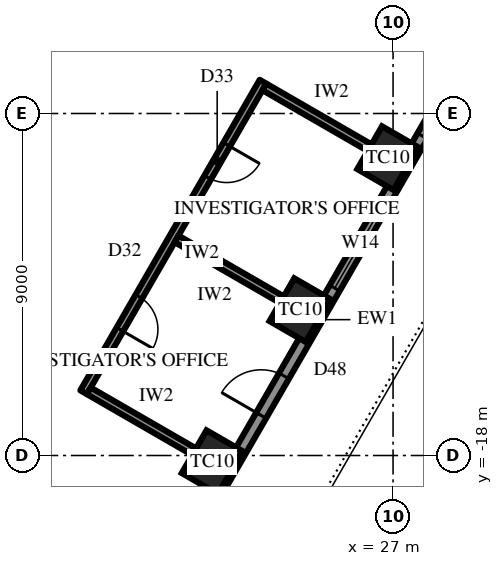
"""IFC4 building model, lengths in metres.
Left out: names, types, materials, properties, quantities, classifications, styles, units other than length and angle.
Written with IfcOpenShell. Run it as: python <this file> out.ifc"""

import sys

from ifc_helpers import new_model, si_unit, direction, frame, frame_2d, origin, origin_2d, place, context, subcontext, project, spatial, rectangle, extrude, element, fill, save


model = new_model("IFC4")
c1 = context("Model", 3, precision=1e-05, world=origin(), true_north=direction((0.0, 1.0)))
c2 = subcontext(c1, "Body", "Model", "MODEL_VIEW")
j1 = project(units=[si_unit("LENGTHUNIT", "METRE"), si_unit("PLANEANGLEUNIT", "RADIAN")], contexts=[c1])
p1 = place(None, origin())
s1 = spatial("IfcSite", under=j1, at=p1, CompositionType="ELEMENT")
p2 = place(p1, origin())
s2 = spatial("IfcBuilding", under=s1, at=p2, CompositionType="ELEMENT")
p3 = place(p2, frame((0.0, 0.0, 236.5)))
s3 = spatial("IfcBuildingStorey", under=s2, at=p3, CompositionType="ELEMENT", Elevation=236.5)
for number, where, z_axis, x_axis in (
    (1, (22.242, -18.175, 0.0), (0.0, 0.0, 1.0), (0.5, 0.866, 0.0)),
    (2, (24.552, -14.175, 0.0), (0.0, 0.0, 1.0), (0.5, 0.866, 0.0)),
    (3, (26.861, -10.175, 0.0), (0.0, 0.0, 1.0), (0.5, 0.866, 0.0)),
):
    element("IfcColumn", number, at=place(p3, frame(where, z_axis=z_axis, x_axis=x_axis)), inside=s3, PredefinedType="COLUMN", context=c2, shape_type="SweptSolid", body=[
        extrude(rectangle(XDim=1.3, YDim=1.1, at=origin_2d()), origin(), (0.0, 0.0, 1.0), 4.2),
    ])
p4 = place(p3, frame((18.707, -25.299, 0.0), z_axis=(0.0, 0.0, 1.0), x_axis=(0.500000442367, 0.866025148383, 0.0)))
e4 = element("IfcWall", 4, at=p4, inside=s3, PredefinedType="SOLIDWALL", context=c2, shape_type="SweptSolid", body=[
    extrude(rectangle(XDim=25.113, YDim=0.3, at=frame_2d((12.556, 0.0))), origin(), (0.0, 0.0, 1.0), 2.8),
])
p5 = place(p4, frame((4.278, 0.0, 0.6)))
e5 = element("IfcOpeningElement", 5, at=p5, cuts=e4, PredefinedType="OPENING", context=c2, shape_type="SweptSolid", body=[
    extrude(rectangle(XDim=2.7, YDim=1.95, at=frame_2d((1.35, 0.975))), frame((0.0, 0.16, 0.0), z_axis=(0.0, -1.0, 0.0), x_axis=(1.0, 0.0, 0.0)), (0.0, 0.0, 1.0), 0.32),
])
p6 = place(p4, frame((9.647, 0.0, 0.0)))
e6 = element("IfcOpeningElement", 6, at=p6, cuts=e4, PredefinedType="OPENING", context=c2, shape_type="SweptSolid", body=[
    extrude(rectangle(XDim=1.2, YDim=2.4, at=frame_2d((0.6, 1.2))), frame((0.0, 0.16, 0.0), z_axis=(0.0, -1.0, 0.0), x_axis=(1.0, 0.0, 0.0)), (0.0, 0.0, 1.0), 0.32),
])
p7 = place(p4, frame((13.516, 0.0, 0.6)))
e7 = element("IfcOpeningElement", 7, at=p7, cuts=e4, PredefinedType="OPENING", context=c2, shape_type="SweptSolid", body=[
    extrude(rectangle(XDim=2.7, YDim=1.95, at=frame_2d((1.35, 0.975))), frame((0.0, 0.16, 0.0), z_axis=(0.0, -1.0, 0.0), x_axis=(1.0, 0.0, 0.0)), (0.0, 0.0, 1.0), 0.32),
])
p8 = place(p4, frame((18.135, 0.0, 0.6)))
e8 = element("IfcOpeningElement", 8, at=p8, cuts=e4, PredefinedType="OPENING", context=c2, shape_type="SweptSolid", body=[
    extrude(rectangle(XDim=2.7, YDim=1.95, at=frame_2d((1.35, 0.975))), frame((0.0, 0.16, 0.0), z_axis=(0.0, -1.0, 0.0), x_axis=(1.0, 0.0, 0.0)), (0.0, 0.0, 1.0), 0.32),
])
p9 = place(p3, frame((18.858, -16.337, 0.0), z_axis=(0.0, 0.0, 1.0), x_axis=(0.499989672313, 0.866031366395, 0.0)))
e9 = element("IfcWall", 9, at=p9, inside=s3, PredefinedType="PARTITIONING", context=c2, shape_type="SweptSolid", body=[
    extrude(rectangle(XDim=9.438, YDim=0.2, at=frame_2d((4.719, 0.0))), origin(), (0.0, 0.0, 1.0), 4.0),
])
p10 = place(p9, frame((1.909, 0.0, 0.0)))
e10 = element("IfcOpeningElement", 10, at=p10, cuts=e9, PredefinedType="OPENING", context=c2, shape_type="SweptSolid", body=[
    extrude(rectangle(XDim=1.0, YDim=2.2, at=frame_2d((0.5, 1.1))), frame((0.0, 0.11, 0.0), z_axis=(0.0, -1.0, 0.0), x_axis=(1.0, 0.0, 0.0)), (0.0, 0.0, 1.0), 0.22),
])
p11 = place(p9, frame((6.528, 0.0, 0.0)))
e11 = element("IfcOpeningElement", 11, at=p11, cuts=e9, PredefinedType="OPENING", context=c2, shape_type="SweptSolid", body=[
    extrude(rectangle(XDim=1.0, YDim=2.2, at=frame_2d((0.5, 1.1))), frame((0.0, 0.11, 0.0), z_axis=(0.0, -1.0, 0.0), x_axis=(1.0, 0.0, 0.0)), (0.0, 0.0, 1.0), 0.22),
])
for number, where, z_axis, x_axis in (
    (12, (18.995, -16.3, 0.0), (0.0, 0.0, 1.0), (0.866, -0.5, 0.0)),
    (13, (21.304, -12.3, 0.0), (0.0, 0.0, 1.0), (0.866, -0.5, 0.0)),
):
    element("IfcWall", number, at=place(p3, frame(where, z_axis=z_axis, x_axis=x_axis)), inside=s3, PredefinedType="PARTITIONING", context=c2, shape_type="SweptSolid", body=[
        extrude(rectangle(XDim=3.2, YDim=0.2, at=frame_2d((1.6, 0.0))), origin(), (0.0, 0.0, 1.0), 3.082),
    ])
p12 = place(p3, frame((23.614, -8.3, 0.0), z_axis=(0.0, 0.0, 1.0), x_axis=(0.866061088033, -0.499938187974, 0.0)))
e14 = element("IfcWall", 14, at=p12, inside=s3, PredefinedType="PARTITIONING", context=c2, shape_type="SweptSolid", body=[
    extrude(rectangle(XDim=3.2, YDim=0.2, at=frame_2d((1.6, 0.0))), origin(), (0.0, 0.0, 1.0), 3.082),
])
p13 = place(p6, origin())
e15 = element("IfcDoor", 15, at=p13, inside=s3, OperationType="SINGLE_SWING_RIGHT", PredefinedType="DOOR", context=c2, shape_type="SweptSolid", body=[
    extrude(rectangle(XDim=1.2, YDim=2.4, at=frame_2d((0.6, 1.2))), frame((0.0, 0.025, 0.0), z_axis=(0.0, -1.0, 0.0), x_axis=(1.0, 0.0, 0.0)), (0.0, 0.0, 1.0), 0.05),
])
fill(e6, e15)
p14 = place(p7, origin())
e16 = element("IfcWindow", 16, at=p14, inside=s3, PartitioningType="SINGLE_PANEL", PredefinedType="WINDOW", context=c2, shape_type="SweptSolid", body=[
    extrude(rectangle(XDim=2.7, YDim=1.95, at=frame_2d((1.35, 0.975))), frame((0.0, 0.03, 0.0), z_axis=(0.0, -1.0, 0.0), x_axis=(1.0, 0.0, 0.0)), (0.0, 0.0, 1.0), 0.06),
])
fill(e7, e16)
p15 = place(p8, origin())
e17 = element("IfcWindow", 17, at=p15, inside=s3, PartitioningType="SINGLE_PANEL", PredefinedType="WINDOW", context=c2, shape_type="SweptSolid", body=[
    extrude(rectangle(XDim=2.7, YDim=1.95, at=frame_2d((1.35, 0.975))), frame((0.0, 0.03, 0.0), z_axis=(0.0, -1.0, 0.0), x_axis=(1.0, 0.0, 0.0)), (0.0, 0.0, 1.0), 0.06),
])
fill(e8, e17)
p16 = place(p10, frame((1.0, 0.0, 0.0), z_axis=(0.0, 0.0, 1.0), x_axis=(-1.0, 0.0, 0.0)))
e18 = element("IfcDoor", 18, at=p16, inside=s3, OperationType="SINGLE_SWING_LEFT", PredefinedType="DOOR", context=c2, shape_type="SweptSolid", body=[
    extrude(rectangle(XDim=1.0, YDim=2.2, at=frame_2d((0.5, 1.1))), frame((0.0, 0.025, 0.0), z_axis=(0.0, -1.0, 0.0), x_axis=(1.0, 0.0, 0.0)), (0.0, 0.0, 1.0), 0.05),
])
fill(e10, e18)
p17 = place(p11, frame((1.0, 0.0, 0.0), z_axis=(0.0, 0.0, 1.0), x_axis=(-1.0, 0.0, 0.0)))
e19 = element("IfcDoor", 19, at=p17, inside=s3, OperationType="SINGLE_SWING_RIGHT", PredefinedType="DOOR", context=c2, shape_type="SweptSolid", body=[
    extrude(rectangle(XDim=1.0, YDim=2.2, at=frame_2d((0.5, 1.1))), frame((0.0, 0.025, 0.0), z_axis=(0.0, -1.0, 0.0), x_axis=(1.0, 0.0, 0.0)), (0.0, 0.0, 1.0), 0.05),
])
fill(e11, e19)
save(model, sys.argv[1])
